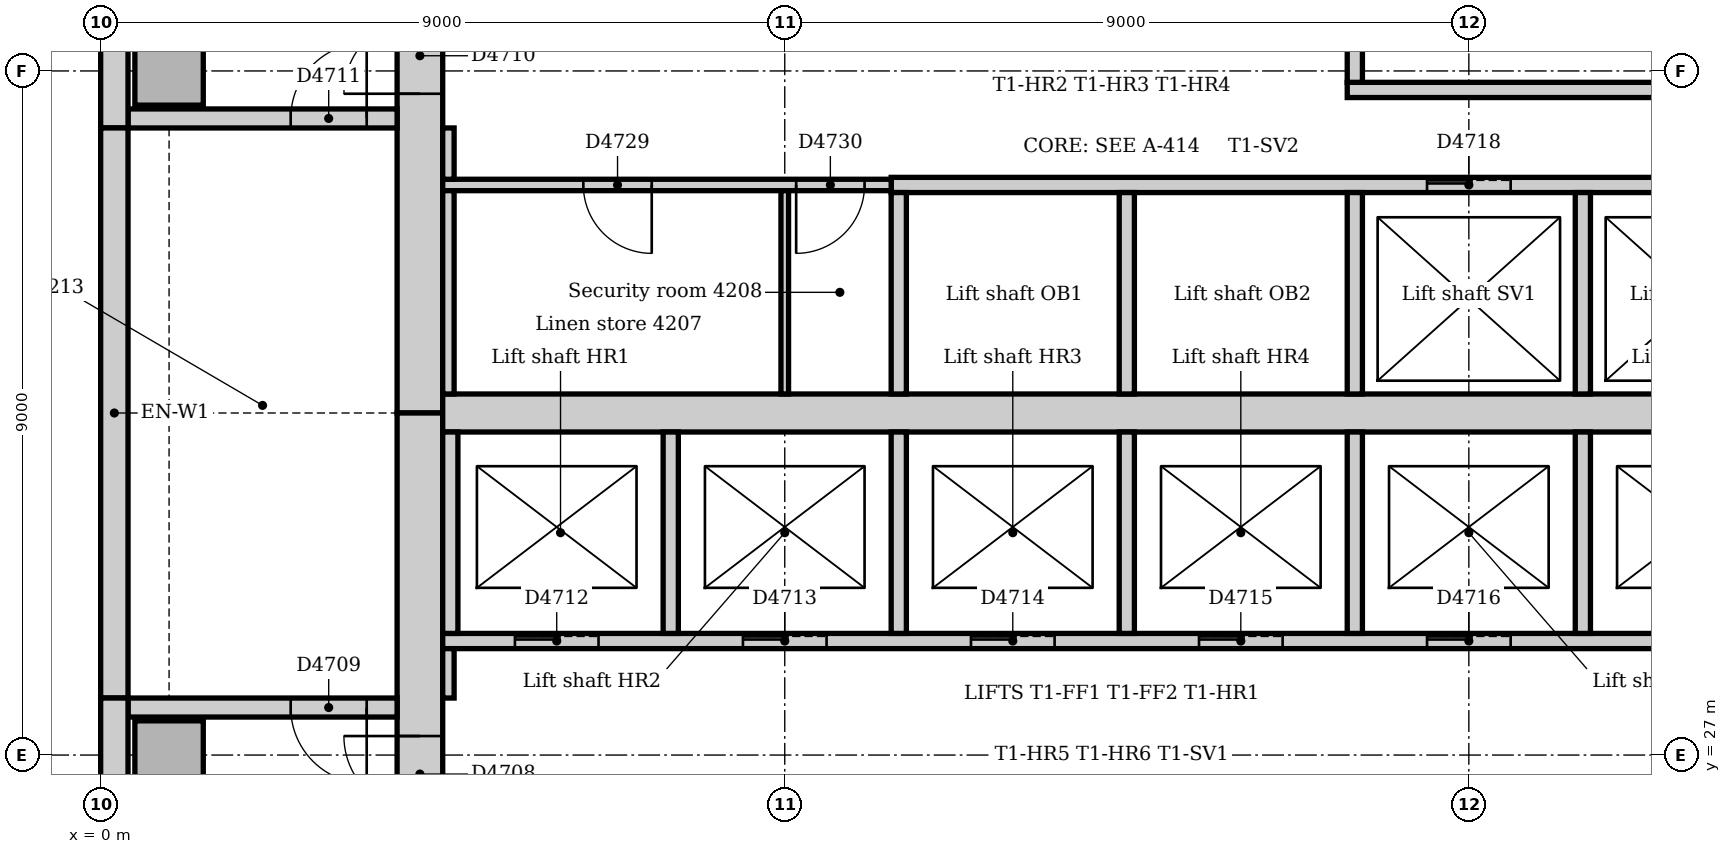
"""IFC4 building model, lengths in metres.
Left out: names, types, materials, properties, quantities, classifications, styles, units other than length and angle.
Written with IfcOpenShell. Run it as: python <this file> out.ifc"""

import sys

from ifc_helpers import new_model, si_unit, direction, frame, frame_2d, origin, origin_2d, place, context, subcontext, project, spatial, rectangle, extrude, element, fill, save


model = new_model("IFC4")
c1 = context("Model", 3, precision=1e-05, world=origin(), true_north=direction((0.0, 1.0)))
c2 = subcontext(c1, "Body", "Model", "MODEL_VIEW")
j1 = project(units=[si_unit("LENGTHUNIT", "METRE"), si_unit("PLANEANGLEUNIT", "RADIAN")], contexts=[c1])
p1 = place(None, origin())
s1 = spatial("IfcSite", under=j1, at=p1, CompositionType="ELEMENT")
p2 = place(p1, origin())
s2 = spatial("IfcBuilding", under=s1, at=p2, CompositionType="ELEMENT")
p3 = place(p2, frame((0.0, 0.0, 177.0)))
s3 = spatial("IfcBuildingStorey", under=s2, at=p3, CompositionType="ELEMENT", Elevation=177.0)
p4 = place(p3, frame((4.2, 42.0, 0.0), z_axis=(0.0, 0.0, 1.0), x_axis=(0.0, -1.0, 0.0)))
e1 = element("IfcWall", 1, at=p4, inside=s3, PredefinedType="SOLIDWALL", context=c2, shape_type="SweptSolid", body=[
    extrude(rectangle(XDim=10.5, YDim=0.6, at=frame_2d((5.25, 0.0))), origin(), (0.0, 0.0, 1.0), 4.0),
])
p5 = place(p4, frame((5.3, 0.0, 0.0)))
e2 = element("IfcOpeningElement", 2, at=p5, cuts=e1, PredefinedType="OPENING", context=c2, shape_type="SweptSolid", body=[
    extrude(rectangle(XDim=1.0, YDim=2.1, at=frame_2d((0.5, 1.05))), frame((0.0, 0.31, 0.0), z_axis=(0.0, -1.0, 0.0), x_axis=(1.0, 0.0, 0.0)), (0.0, 0.0, 1.0), 0.62),
])
p6 = place(p3, frame((4.2, 31.5, 0.0), z_axis=(0.0, 0.0, 1.0), x_axis=(0.0, -1.0, 0.0)))
e3 = element("IfcWall", 3, at=p6, inside=s3, PredefinedType="SOLIDWALL", context=c2, shape_type="SweptSolid", body=[
    extrude(rectangle(XDim=10.5, YDim=0.6, at=frame_2d((5.25, 0.0))), origin(), (0.0, 0.0, 1.0), 4.0),
])
p7 = place(p6, frame((4.25, 0.0, 0.0)))
e4 = element("IfcOpeningElement", 4, at=p7, cuts=e3, PredefinedType="OPENING", context=c2, shape_type="SweptSolid", body=[
    extrude(rectangle(XDim=1.0, YDim=2.1, at=frame_2d((0.5, 1.05))), frame((0.0, 0.31, 0.0), z_axis=(0.0, -1.0, 0.0), x_axis=(1.0, 0.0, 0.0)), (0.0, 0.0, 1.0), 0.62),
])
p8 = place(p3, frame((4.5, 31.5, 0.0), z_axis=(0.0, 0.0, 1.0), x_axis=(1.0, 0.0, 0.0)))
e5 = element("IfcWall", 5, at=p8, inside=s3, PredefinedType="SOLIDWALL", context=c2, shape_type="SweptSolid", body=[
    extrude(rectangle(XDim=18.0, YDim=0.5, at=frame_2d((9.0, 0.0))), origin(), (0.0, 0.0, 1.0), 4.0),
])
p9 = place(p3, frame((3.9, 27.625, 0.0), z_axis=(0.0, 0.0, 1.0), x_axis=(-1.0, 0.0, 0.0)))
e6 = element("IfcWall", 6, at=p9, inside=s3, PredefinedType="SOLIDWALL", context=c2, shape_type="SweptSolid", body=[
    extrude(rectangle(XDim=3.54, YDim=0.25, at=frame_2d((1.77, 0.0))), origin(), (0.0, 0.0, 1.0), 4.0),
])
p10 = place(p9, frame((0.4, 0.0, 0.0)))
e7 = element("IfcOpeningElement", 7, at=p10, cuts=e6, PredefinedType="OPENING", context=c2, shape_type="SweptSolid", body=[
    extrude(rectangle(XDim=1.0, YDim=2.1, at=frame_2d((0.5, 1.05))), frame((0.0, 0.135, 0.0), z_axis=(0.0, -1.0, 0.0), x_axis=(1.0, 0.0, 0.0)), (0.0, 0.0, 1.0), 0.27),
])
p11 = place(p3, frame((0.36, 35.375, 0.0), z_axis=(0.0, 0.0, 1.0), x_axis=(1.0, 0.0, 0.0)))
e8 = element("IfcWall", 8, at=p11, inside=s3, PredefinedType="SOLIDWALL", context=c2, shape_type="SweptSolid", body=[
    extrude(rectangle(XDim=3.54, YDim=0.25, at=frame_2d((1.77, 0.0))), origin(), (0.0, 0.0, 1.0), 4.0),
])
p12 = place(p11, frame((2.14, 0.0, 0.0)))
e9 = element("IfcOpeningElement", 9, at=p12, cuts=e8, PredefinedType="OPENING", context=c2, shape_type="SweptSolid", body=[
    extrude(rectangle(XDim=1.0, YDim=2.1, at=frame_2d((0.5, 1.05))), frame((0.0, 0.135, 0.0), z_axis=(0.0, -1.0, 0.0), x_axis=(1.0, 0.0, 0.0)), (0.0, 0.0, 1.0), 0.27),
])
for number, where, z_axis, x_axis in (
    (10, (0.9, 27.0, 0.0), (0.0, 0.0, 1.0), (1.0, 0.0, 0.0)),
    (11, (0.9, 36.0, 0.0), (0.0, 0.0, 1.0), (1.0, 0.0, 0.0)),
):
    element("IfcColumn", number, at=place(p3, frame(where, z_axis=z_axis, x_axis=x_axis)), inside=s3, PredefinedType="COLUMN", context=c2, shape_type="SweptSolid", body=[
        extrude(rectangle(XDim=0.9, YDim=0.9, at=origin_2d()), origin(), (0.0, 0.0, 1.0), 4.0),
    ])
p13 = place(p3, frame((0.18, 42.0, 0.0), z_axis=(0.0, 0.0, 1.0), x_axis=(0.0, -1.0, 0.0)))
e12 = element("IfcWall", 12, at=p13, inside=s3, PredefinedType="STANDARD", context=c2, shape_type="SweptSolid", body=[
    extrude(rectangle(XDim=6.75, YDim=0.36, at=frame_2d((3.375, 0.0))), origin(), (0.0, 0.0, 1.0), 3.85),
])
p14 = place(p3, frame((0.18, 35.25, 0.0), z_axis=(0.0, 0.0, 1.0), x_axis=(0.0, -1.0, 0.0)))
e13 = element("IfcWall", 13, at=p14, inside=s3, PredefinedType="STANDARD", context=c2, shape_type="SweptSolid", body=[
    extrude(rectangle(XDim=7.5, YDim=0.36, at=frame_2d((3.75, 0.0))), origin(), (0.0, 0.0, 1.0), 3.85),
])
p15 = place(p3, frame((0.18, 27.75, 0.0), z_axis=(0.0, 0.0, 1.0), x_axis=(0.0, -1.0, 0.0)))
e14 = element("IfcWall", 14, at=p15, inside=s3, PredefinedType="STANDARD", context=c2, shape_type="SweptSolid", body=[
    extrude(rectangle(XDim=6.75, YDim=0.36, at=frame_2d((3.375, 0.0))), origin(), (0.0, 0.0, 1.0), 3.85),
])
p16 = place(p3, frame((16.4, 35.75, 0.0), z_axis=(0.0, 0.0, 1.0), x_axis=(1.0, 0.0, 0.0)))
e15 = element("IfcWall", 15, at=p16, inside=s3, PredefinedType="PARTITIONING", context=c2, shape_type="SweptSolid", body=[
    extrude(rectangle(XDim=6.1, YDim=0.2, at=frame_2d((3.05, 0.0))), origin(), (0.0, 0.0, 1.0), 3.85),
])
p17 = place(p3, frame((16.5, 35.85, 0.0), z_axis=(0.0, 0.0, 1.0), x_axis=(0.0, 1.0, 0.0)))
e16 = element("IfcWall", 16, at=p17, inside=s3, PredefinedType="PARTITIONING", context=c2, shape_type="SweptSolid", body=[
    extrude(rectangle(XDim=2.55, YDim=0.2, at=frame_2d((1.275, 0.0))), origin(), (0.0, 0.0, 1.0), 3.85),
])
p18 = place(p3, frame((4.5, 28.5, 0.0), z_axis=(0.0, 0.0, 1.0), x_axis=(1.0, 0.0, 0.0)))
e17 = element("IfcWall", 17, at=p18, inside=s3, PredefinedType="PARTITIONING", context=c2, shape_type="SweptSolid", body=[
    extrude(rectangle(XDim=18.0, YDim=0.2, at=frame_2d((9.0, 0.0))), origin(), (0.0, 0.0, 1.0), 3.85),
])
p19 = place(p18, frame((0.95, 0.0, 0.0)))
e18 = element("IfcOpeningElement", 18, at=p19, cuts=e17, PredefinedType="OPENING", context=c2, shape_type="SweptSolid", body=[
    extrude(rectangle(XDim=1.1, YDim=2.1, at=frame_2d((0.55, 1.05))), frame((0.0, 0.11, 0.0), z_axis=(0.0, -1.0, 0.0), x_axis=(1.0, 0.0, 0.0)), (0.0, 0.0, 1.0), 0.22),
])
p20 = place(p18, frame((3.95, 0.0, 0.0)))
e19 = element("IfcOpeningElement", 19, at=p20, cuts=e17, PredefinedType="OPENING", context=c2, shape_type="SweptSolid", body=[
    extrude(rectangle(XDim=1.1, YDim=2.1, at=frame_2d((0.55, 1.05))), frame((0.0, 0.11, 0.0), z_axis=(0.0, -1.0, 0.0), x_axis=(1.0, 0.0, 0.0)), (0.0, 0.0, 1.0), 0.22),
])
p21 = place(p18, frame((6.95, 0.0, 0.0)))
e20 = element("IfcOpeningElement", 20, at=p21, cuts=e17, PredefinedType="OPENING", context=c2, shape_type="SweptSolid", body=[
    extrude(rectangle(XDim=1.1, YDim=2.1, at=frame_2d((0.55, 1.05))), frame((0.0, 0.11, 0.0), z_axis=(0.0, -1.0, 0.0), x_axis=(1.0, 0.0, 0.0)), (0.0, 0.0, 1.0), 0.22),
])
p22 = place(p18, frame((9.95, 0.0, 0.0)))
e21 = element("IfcOpeningElement", 21, at=p22, cuts=e17, PredefinedType="OPENING", context=c2, shape_type="SweptSolid", body=[
    extrude(rectangle(XDim=1.1, YDim=2.1, at=frame_2d((0.55, 1.05))), frame((0.0, 0.11, 0.0), z_axis=(0.0, -1.0, 0.0), x_axis=(1.0, 0.0, 0.0)), (0.0, 0.0, 1.0), 0.22),
])
p23 = place(p18, frame((12.95, 0.0, 0.0)))
e22 = element("IfcOpeningElement", 22, at=p23, cuts=e17, PredefinedType="OPENING", context=c2, shape_type="SweptSolid", body=[
    extrude(rectangle(XDim=1.1, YDim=2.1, at=frame_2d((0.55, 1.05))), frame((0.0, 0.11, 0.0), z_axis=(0.0, -1.0, 0.0), x_axis=(1.0, 0.0, 0.0)), (0.0, 0.0, 1.0), 0.22),
])
p24 = place(p18, frame((15.95, 0.0, 0.0)))
e23 = element("IfcOpeningElement", 23, at=p24, cuts=e17, PredefinedType="OPENING", context=c2, shape_type="SweptSolid", body=[
    extrude(rectangle(XDim=1.1, YDim=2.1, at=frame_2d((0.55, 1.05))), frame((0.0, 0.11, 0.0), z_axis=(0.0, -1.0, 0.0), x_axis=(1.0, 0.0, 0.0)), (0.0, 0.0, 1.0), 0.22),
])
p25 = place(p3, frame((10.4, 34.5, 0.0), z_axis=(0.0, 0.0, 1.0), x_axis=(1.0, 0.0, 0.0)))
e24 = element("IfcWall", 24, at=p25, inside=s3, PredefinedType="PARTITIONING", context=c2, shape_type="SweptSolid", body=[
    extrude(rectangle(XDim=12.1, YDim=0.2, at=frame_2d((6.05, 0.0))), origin(), (0.0, 0.0, 1.0), 3.85),
])
p26 = place(p25, frame((7.05, 0.0, 0.0)))
e25 = element("IfcOpeningElement", 25, at=p26, cuts=e24, PredefinedType="OPENING", context=c2, shape_type="SweptSolid", body=[
    extrude(rectangle(XDim=1.1, YDim=2.1, at=frame_2d((0.55, 1.05))), frame((0.0, 0.11, 0.0), z_axis=(0.0, -1.0, 0.0), x_axis=(1.0, 0.0, 0.0)), (0.0, 0.0, 1.0), 0.22),
])
p27 = place(p25, frame((10.05, 0.0, 0.0)))
e26 = element("IfcOpeningElement", 26, at=p27, cuts=e24, PredefinedType="OPENING", context=c2, shape_type="SweptSolid", body=[
    extrude(rectangle(XDim=1.1, YDim=2.1, at=frame_2d((0.55, 1.05))), frame((0.0, 0.11, 0.0), z_axis=(0.0, -1.0, 0.0), x_axis=(1.0, 0.0, 0.0)), (0.0, 0.0, 1.0), 0.22),
])
for number, where, z_axis, x_axis in (
    (27, (10.5, 28.6, 0.0), (0.0, 0.0, 1.0), (0.0, 1.0, 0.0)),
    (28, (10.5, 31.75, 0.0), (0.0, 0.0, 1.0), (0.0, 1.0, 0.0)),
    (29, (13.5, 28.6, 0.0), (0.0, 0.0, 1.0), (0.0, 1.0, 0.0)),
    (30, (13.5, 31.75, 0.0), (0.0, 0.0, 1.0), (0.0, 1.0, 0.0)),
    (31, (16.5, 28.6, 0.0), (0.0, 0.0, 1.0), (0.0, 1.0, 0.0)),
    (32, (16.5, 31.75, 0.0), (0.0, 0.0, 1.0), (0.0, 1.0, 0.0)),
    (33, (19.5, 28.6, 0.0), (0.0, 0.0, 1.0), (0.0, 1.0, 0.0)),
    (34, (19.5, 31.75, 0.0), (0.0, 0.0, 1.0), (0.0, 1.0, 0.0)),
    (35, (4.6, 28.6, 0.0), (0.0, 0.0, 1.0), (0.0, 1.0, 0.0)),
    (36, (7.5, 28.6, 0.0), (0.0, 0.0, 1.0), (0.0, 1.0, 0.0)),
):
    element("IfcWall", number, at=place(p3, frame(where, z_axis=z_axis, x_axis=x_axis)), inside=s3, PredefinedType="PARTITIONING", context=c2, shape_type="SweptSolid", body=[
        extrude(rectangle(XDim=2.65, YDim=0.2, at=frame_2d((1.325, 0.0))), origin(), (0.0, 0.0, 1.0), 3.85),
    ])
p28 = place(p3, frame((4.5, 34.5, 0.0), z_axis=(0.0, 0.0, 1.0), x_axis=(1.0, 0.0, 0.0)))
e37 = element("IfcWall", 37, at=p28, inside=s3, PredefinedType="PARTITIONING", context=c2, shape_type="SweptSolid", body=[
    extrude(rectangle(XDim=5.9, YDim=0.15, at=frame_2d((2.95, 0.0))), origin(), (0.0, 0.0, 1.0), 3.85),
])
p29 = place(p28, frame((1.85, 0.0, 0.0)))
e38 = element("IfcOpeningElement", 38, at=p29, cuts=e37, PredefinedType="OPENING", context=c2, shape_type="SweptSolid", body=[
    extrude(rectangle(XDim=0.9, YDim=2.1, at=frame_2d((0.45, 1.05))), frame((0.0, 0.085, 0.0), z_axis=(0.0, -1.0, 0.0), x_axis=(1.0, 0.0, 0.0)), (0.0, 0.0, 1.0), 0.17),
])
p30 = place(p28, frame((4.65, 0.0, 0.0)))
e39 = element("IfcOpeningElement", 39, at=p30, cuts=e37, PredefinedType="OPENING", context=c2, shape_type="SweptSolid", body=[
    extrude(rectangle(XDim=0.9, YDim=2.1, at=frame_2d((0.45, 1.05))), frame((0.0, 0.085, 0.0), z_axis=(0.0, -1.0, 0.0), x_axis=(1.0, 0.0, 0.0)), (0.0, 0.0, 1.0), 0.17),
])
p31 = place(p3, frame((4.575, 34.575, 0.0), z_axis=(0.0, 0.0, 1.0), x_axis=(0.0, 1.0, 0.0)))
e40 = element("IfcWall", 40, at=p31, inside=s3, PredefinedType="PARTITIONING", context=c2, shape_type="SweptSolid", body=[
    extrude(rectangle(XDim=0.675, YDim=0.15, at=frame_2d((0.338, 0.0))), origin(), (0.0, 0.0, 1.0), 3.85),
])
p32 = place(p3, frame((4.575, 31.75, 0.0), z_axis=(0.0, 0.0, 1.0), x_axis=(0.0, 1.0, 0.0)))
e41 = element("IfcWall", 41, at=p32, inside=s3, PredefinedType="PARTITIONING", context=c2, shape_type="SweptSolid", body=[
    extrude(rectangle(XDim=2.675, YDim=0.15, at=frame_2d((1.337, 0.0))), origin(), (0.0, 0.0, 1.0), 3.85),
])
p33 = place(p3, frame((4.575, 27.75, 0.0), z_axis=(0.0, 0.0, 1.0), x_axis=(0.0, 1.0, 0.0)))
e42 = element("IfcWall", 42, at=p33, inside=s3, PredefinedType="PARTITIONING", context=c2, shape_type="SweptSolid", body=[
    extrude(rectangle(XDim=0.65, YDim=0.15, at=frame_2d((0.325, 0.0))), origin(), (0.0, 0.0, 1.0), 3.85),
])
p34 = place(p3, frame((9.0, 31.75, 0.0), z_axis=(0.0, 0.0, 1.0), x_axis=(0.0, 1.0, 0.0)))
e43 = element("IfcWall", 43, at=p34, inside=s3, PredefinedType="PARTITIONING", context=c2, shape_type="SweptSolid", body=[
    extrude(rectangle(XDim=2.675, YDim=0.1, at=frame_2d((1.337, 0.0))), origin(), (0.0, 0.0, 1.0), 3.85),
])
p35 = place(p7, frame((1.0, 0.0, 0.0), z_axis=(0.0, 0.0, 1.0), x_axis=(-1.0, 0.0, 0.0)))
e44 = element("IfcDoor", 44, at=p35, inside=s3, OperationType="SINGLE_SWING_RIGHT", PredefinedType="DOOR", context=c2, shape_type="SweptSolid", body=[
    extrude(rectangle(XDim=1.0, YDim=2.1, at=frame_2d((0.5, 1.05))), frame((0.0, 0.025, 0.0), z_axis=(0.0, -1.0, 0.0), x_axis=(1.0, 0.0, 0.0)), (0.0, 0.0, 1.0), 0.05),
])
fill(e4, e44)
p36 = place(p10, origin())
e45 = element("IfcDoor", 45, at=p36, inside=s3, OperationType="SINGLE_SWING_LEFT", PredefinedType="DOOR", context=c2, shape_type="SweptSolid", body=[
    extrude(rectangle(XDim=1.0, YDim=2.1, at=frame_2d((0.5, 1.05))), frame((0.0, 0.025, 0.0), z_axis=(0.0, -1.0, 0.0), x_axis=(1.0, 0.0, 0.0)), (0.0, 0.0, 1.0), 0.05),
])
fill(e7, e45)
p37 = place(p5, frame((1.0, 0.0, 0.0), z_axis=(0.0, 0.0, 1.0), x_axis=(-1.0, 0.0, 0.0)))
e46 = element("IfcDoor", 46, at=p37, inside=s3, OperationType="SINGLE_SWING_LEFT", PredefinedType="DOOR", context=c2, shape_type="SweptSolid", body=[
    extrude(rectangle(XDim=1.0, YDim=2.1, at=frame_2d((0.5, 1.05))), frame((0.0, 0.025, 0.0), z_axis=(0.0, -1.0, 0.0), x_axis=(1.0, 0.0, 0.0)), (0.0, 0.0, 1.0), 0.05),
])
fill(e2, e46)
p38 = place(p12, origin())
e47 = element("IfcDoor", 47, at=p38, inside=s3, OperationType="SINGLE_SWING_RIGHT", PredefinedType="DOOR", context=c2, shape_type="SweptSolid", body=[
    extrude(rectangle(XDim=1.0, YDim=2.1, at=frame_2d((0.5, 1.05))), frame((0.0, 0.025, 0.0), z_axis=(0.0, -1.0, 0.0), x_axis=(1.0, 0.0, 0.0)), (0.0, 0.0, 1.0), 0.05),
])
fill(e9, e47)
p39 = place(p19, origin())
e48 = element("IfcDoor", 48, at=p39, inside=s3, OperationType="SLIDING_TO_LEFT", PredefinedType="DOOR", context=c2, shape_type="SweptSolid", body=[
    extrude(rectangle(XDim=1.1, YDim=2.1, at=frame_2d((0.55, 1.05))), frame((0.0, 0.025, 0.0), z_axis=(0.0, -1.0, 0.0), x_axis=(1.0, 0.0, 0.0)), (0.0, 0.0, 1.0), 0.05),
])
fill(e18, e48)
p40 = place(p20, origin())
e49 = element("IfcDoor", 49, at=p40, inside=s3, OperationType="SLIDING_TO_LEFT", PredefinedType="DOOR", context=c2, shape_type="SweptSolid", body=[
    extrude(rectangle(XDim=1.1, YDim=2.1, at=frame_2d((0.55, 1.05))), frame((0.0, 0.025, 0.0), z_axis=(0.0, -1.0, 0.0), x_axis=(1.0, 0.0, 0.0)), (0.0, 0.0, 1.0), 0.05),
])
fill(e19, e49)
p41 = place(p21, origin())
e50 = element("IfcDoor", 50, at=p41, inside=s3, OperationType="SLIDING_TO_LEFT", PredefinedType="DOOR", context=c2, shape_type="SweptSolid", body=[
    extrude(rectangle(XDim=1.1, YDim=2.1, at=frame_2d((0.55, 1.05))), frame((0.0, 0.025, 0.0), z_axis=(0.0, -1.0, 0.0), x_axis=(1.0, 0.0, 0.0)), (0.0, 0.0, 1.0), 0.05),
])
fill(e20, e50)
p42 = place(p22, origin())
e51 = element("IfcDoor", 51, at=p42, inside=s3, OperationType="SLIDING_TO_LEFT", PredefinedType="DOOR", context=c2, shape_type="SweptSolid", body=[
    extrude(rectangle(XDim=1.1, YDim=2.1, at=frame_2d((0.55, 1.05))), frame((0.0, 0.025, 0.0), z_axis=(0.0, -1.0, 0.0), x_axis=(1.0, 0.0, 0.0)), (0.0, 0.0, 1.0), 0.05),
])
fill(e21, e51)
p43 = place(p23, origin())
e52 = element("IfcDoor", 52, at=p43, inside=s3, OperationType="SLIDING_TO_LEFT", PredefinedType="DOOR", context=c2, shape_type="SweptSolid", body=[
    extrude(rectangle(XDim=1.1, YDim=2.1, at=frame_2d((0.55, 1.05))), frame((0.0, 0.025, 0.0), z_axis=(0.0, -1.0, 0.0), x_axis=(1.0, 0.0, 0.0)), (0.0, 0.0, 1.0), 0.05),
])
fill(e22, e52)
p44 = place(p26, origin())
e53 = element("IfcDoor", 53, at=p44, inside=s3, OperationType="SLIDING_TO_LEFT", PredefinedType="DOOR", context=c2, shape_type="SweptSolid", body=[
    extrude(rectangle(XDim=1.1, YDim=2.1, at=frame_2d((0.55, 1.05))), frame((0.0, 0.025, 0.0), z_axis=(0.0, -1.0, 0.0), x_axis=(1.0, 0.0, 0.0)), (0.0, 0.0, 1.0), 0.05),
])
fill(e25, e53)
p45 = place(p29, frame((0.9, 0.0, 0.0), z_axis=(0.0, 0.0, 1.0), x_axis=(-1.0, 0.0, 0.0)))
e54 = element("IfcDoor", 54, at=p45, inside=s3, OperationType="SINGLE_SWING_LEFT", PredefinedType="DOOR", context=c2, shape_type="SweptSolid", body=[
    extrude(rectangle(XDim=0.9, YDim=2.1, at=frame_2d((0.45, 1.05))), frame((0.0, 0.025, 0.0), z_axis=(0.0, -1.0, 0.0), x_axis=(1.0, 0.0, 0.0)), (0.0, 0.0, 1.0), 0.05),
])
fill(e38, e54)
p46 = place(p30, frame((0.9, 0.0, 0.0), z_axis=(0.0, 0.0, 1.0), x_axis=(-1.0, 0.0, 0.0)))
e55 = element("IfcDoor", 55, at=p46, inside=s3, OperationType="SINGLE_SWING_RIGHT", PredefinedType="DOOR", context=c2, shape_type="SweptSolid", body=[
    extrude(rectangle(XDim=0.9, YDim=2.1, at=frame_2d((0.45, 1.05))), frame((0.0, 0.025, 0.0), z_axis=(0.0, -1.0, 0.0), x_axis=(1.0, 0.0, 0.0)), (0.0, 0.0, 1.0), 0.05),
])
fill(e39, e55)
save(model, sys.argv[1])
